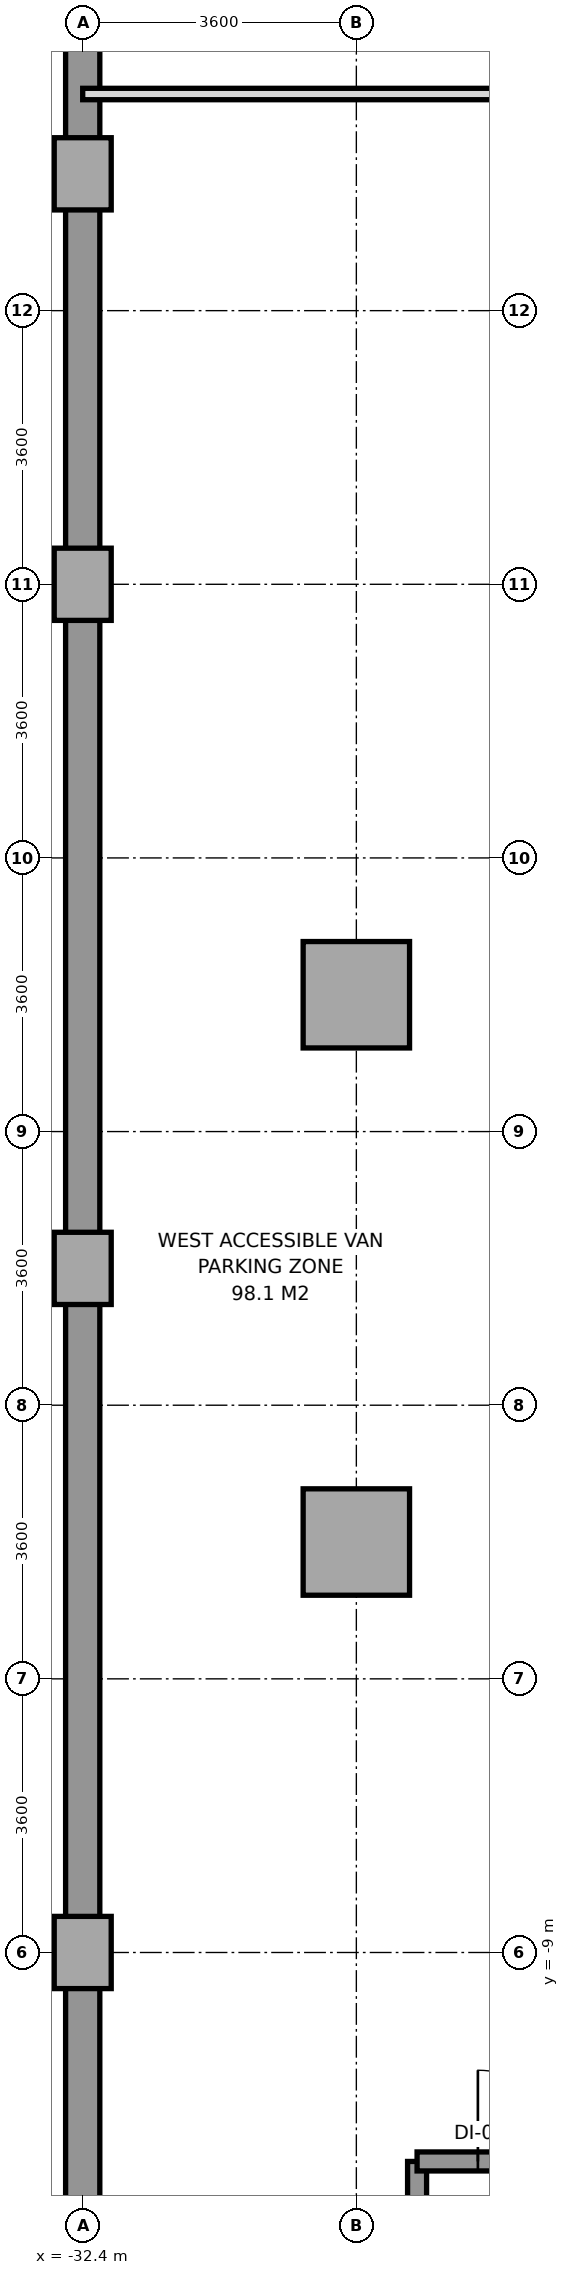
"""IFC4 building model, lengths in metres.
Left out: names, types, materials, properties, quantities, classifications, styles, units other than length and angle.
Written with IfcOpenShell. Run it as: python <this file> out.ifc"""

import sys

from ifc_helpers import new_model, si_unit, direction, frame, frame_2d, origin, origin_2d, place, context, subcontext, project, spatial, rectangle, extrude, source, transform, mapped, element, fill, save


model = new_model("IFC4")
c1 = context("Model", 3, precision=1e-05, world=origin(), true_north=direction((0.0, 1.0)))
c2 = subcontext(c1, "Body", "Model", "MODEL_VIEW")
j1 = project(units=[si_unit("LENGTHUNIT", "METRE"), si_unit("PLANEANGLEUNIT", "RADIAN")], contexts=[c1])
p1 = place(None, origin())
s1 = spatial("IfcSite", under=j1, at=p1, CompositionType="ELEMENT")
p2 = place(p1, origin())
s2 = spatial("IfcBuilding", under=s1, at=p2, CompositionType="ELEMENT")
p3 = place(p2, frame((0.0, 0.0, -4.2)))
s3 = spatial("IfcBuildingStorey", under=s2, at=p3, CompositionType="ELEMENT", Elevation=-4.2)
m1 = source(origin(), c2, "Body", "SweptSolid", [
    extrude(rectangle(XDim=0.75, YDim=0.95, at=origin_2d()), origin(), (0.0, 0.0, 1.0), 3.95),
])
for number, where, z_axis, x_axis in (
    (1, (-32.4, -9.0, 0.0), (0.0, 0.0, 1.0), (1.0, 0.0, 0.0)),
    (2, (-32.4, 0.0, 0.0), (0.0, 0.0, 1.0), (1.0, 0.0, 0.0)),
    (3, (-32.4, 9.0, 0.0), (0.0, 0.0, 1.0), (1.0, 0.0, 0.0)),
    (4, (-32.4, 14.4, 0.0), (0.0, 0.0, 1.0), (1.0, 0.0, 0.0)),
):
    element("IfcColumn", number, at=place(p3, frame(where, z_axis=z_axis, x_axis=x_axis)), inside=s3, PredefinedType="COLUMN", context=c2, shape_type="MappedRepresentation", body=[
        mapped(m1, transform((0.0, 0.0, 0.0), x_axis=(1.0, 0.0, 0.0), y_axis=(0.0, 1.0, 0.0), z_axis=(0.0, 0.0, 1.0), scale=1.0)),
    ])
m2 = source(origin(), c2, "Body", "SweptSolid", [
    extrude(rectangle(XDim=1.4, YDim=1.4, at=origin_2d()), origin(), (0.0, 0.0, 1.0), 3.95),
])
for number, where, z_axis, x_axis in (
    (5, (-28.8, -3.6, 0.0), (0.0, 0.0, 1.0), (1.0, 0.0, 0.0)),
    (6, (-28.8, 3.6, 0.0), (0.0, 0.0, 1.0), (1.0, 0.0, 0.0)),
):
    element("IfcColumn", number, at=place(p3, frame(where, z_axis=z_axis, x_axis=x_axis)), inside=s3, PredefinedType="COLUMN", context=c2, shape_type="MappedRepresentation", body=[
        mapped(m2, transform((0.0, 0.0, 0.0), x_axis=(1.0, 0.0, 0.0), y_axis=(0.0, 1.0, 0.0), z_axis=(0.0, 0.0, 1.0), scale=1.0)),
    ])
p4 = place(p3, frame((-32.4, 23.4, 0.0), z_axis=(0.0, 0.0, 1.0), x_axis=(0.0, -1.0, 0.0)))
e7 = element("IfcWall", 7, at=p4, inside=s3, PredefinedType="USERDEFINED", context=c2, shape_type="SweptSolid", body=[
    extrude(rectangle(XDim=43.2, YDim=0.45, at=frame_2d((21.6, 0.0))), origin(), (0.0, 0.0, 1.0), 3.95),
])
p5 = place(p3, frame((-28.001, -18.671, 0.0), z_axis=(0.0, 0.0, 1.0), x_axis=(0.0, 1.0, 0.0)))
e8 = element("IfcWall", 8, at=p5, inside=s3, PredefinedType="SOLIDWALL", context=c2, shape_type="SweptSolid", body=[
    extrude(rectangle(XDim=6.922, YDim=0.25, at=frame_2d((3.461, 0.0))), origin(), (0.0, 0.0, 1.0), 3.95),
])
p6 = place(p3, frame((-28.001, -11.749, 0.0), z_axis=(0.0, 0.0, 1.0), x_axis=(1.0, 0.0, 0.0)))
e9 = element("IfcWall", 9, at=p6, inside=s3, PredefinedType="SOLIDWALL", context=c2, shape_type="SweptSolid", body=[
    extrude(rectangle(XDim=3.122, YDim=0.25, at=frame_2d((1.561, 0.0))), origin(), (0.0, 0.0, 1.0), 3.95),
])
p7 = place(p6, frame((0.8, 0.0, 0.0)))
e10 = element("IfcOpeningElement", 10, at=p7, cuts=e9, PredefinedType="OPENING", context=c2, shape_type="SweptSolid", body=[
    extrude(rectangle(XDim=1.2, YDim=2.2, at=frame_2d((0.6, 1.1))), frame((0.0, 0.135, 0.0), z_axis=(0.0, -1.0, 0.0), x_axis=(1.0, 0.0, 0.0)), (0.0, 0.0, 1.0), 0.27),
])
p8 = place(p3, frame((-32.4, 15.45, 0.0), z_axis=(0.0, 0.0, 1.0), x_axis=(1.0, 0.0, 0.0)))
e11 = element("IfcWall", 11, at=p8, inside=s3, PredefinedType="PARTITIONING", context=c2, shape_type="SweptSolid", body=[
    extrude(rectangle(XDim=29.2, YDim=0.15, at=frame_2d((14.6, 0.0))), origin(), (0.0, 0.0, 1.0), 3.3),
])
p9 = place(p8, frame((12.0, 0.0, 0.0)))
e12 = element("IfcOpeningElement", 12, at=p9, cuts=e11, PredefinedType="OPENING", context=c2, shape_type="SweptSolid", body=[
    extrude(rectangle(XDim=1.2, YDim=2.2, at=frame_2d((0.6, 1.1))), frame((0.0, 0.085, 0.0), z_axis=(0.0, -1.0, 0.0), x_axis=(1.0, 0.0, 0.0)), (0.0, 0.0, 1.0), 0.17),
])
m3 = source(origin(), c2, "Body", "SweptSolid", [
    extrude(rectangle(XDim=1.2, YDim=2.2, at=frame_2d((0.6, 1.1))), frame((0.0, 0.025, 0.0), z_axis=(0.0, -1.0, 0.0), x_axis=(1.0, 0.0, 0.0)), (0.0, 0.0, 1.0), 0.05),
])
p10 = place(p7, origin())
e13 = element("IfcDoor", 13, at=p10, inside=s3, OperationType="SINGLE_SWING_LEFT", PredefinedType="DOOR", context=c2, shape_type="MappedRepresentation", body=[
    mapped(m3, transform((0.0, 0.0, 0.0), x_axis=(1.0, 0.0, 0.0), y_axis=(0.0, 1.0, 0.0), z_axis=(0.0, 0.0, 1.0), scale=1.0)),
])
fill(e10, e13)
save(model, sys.argv[1])
